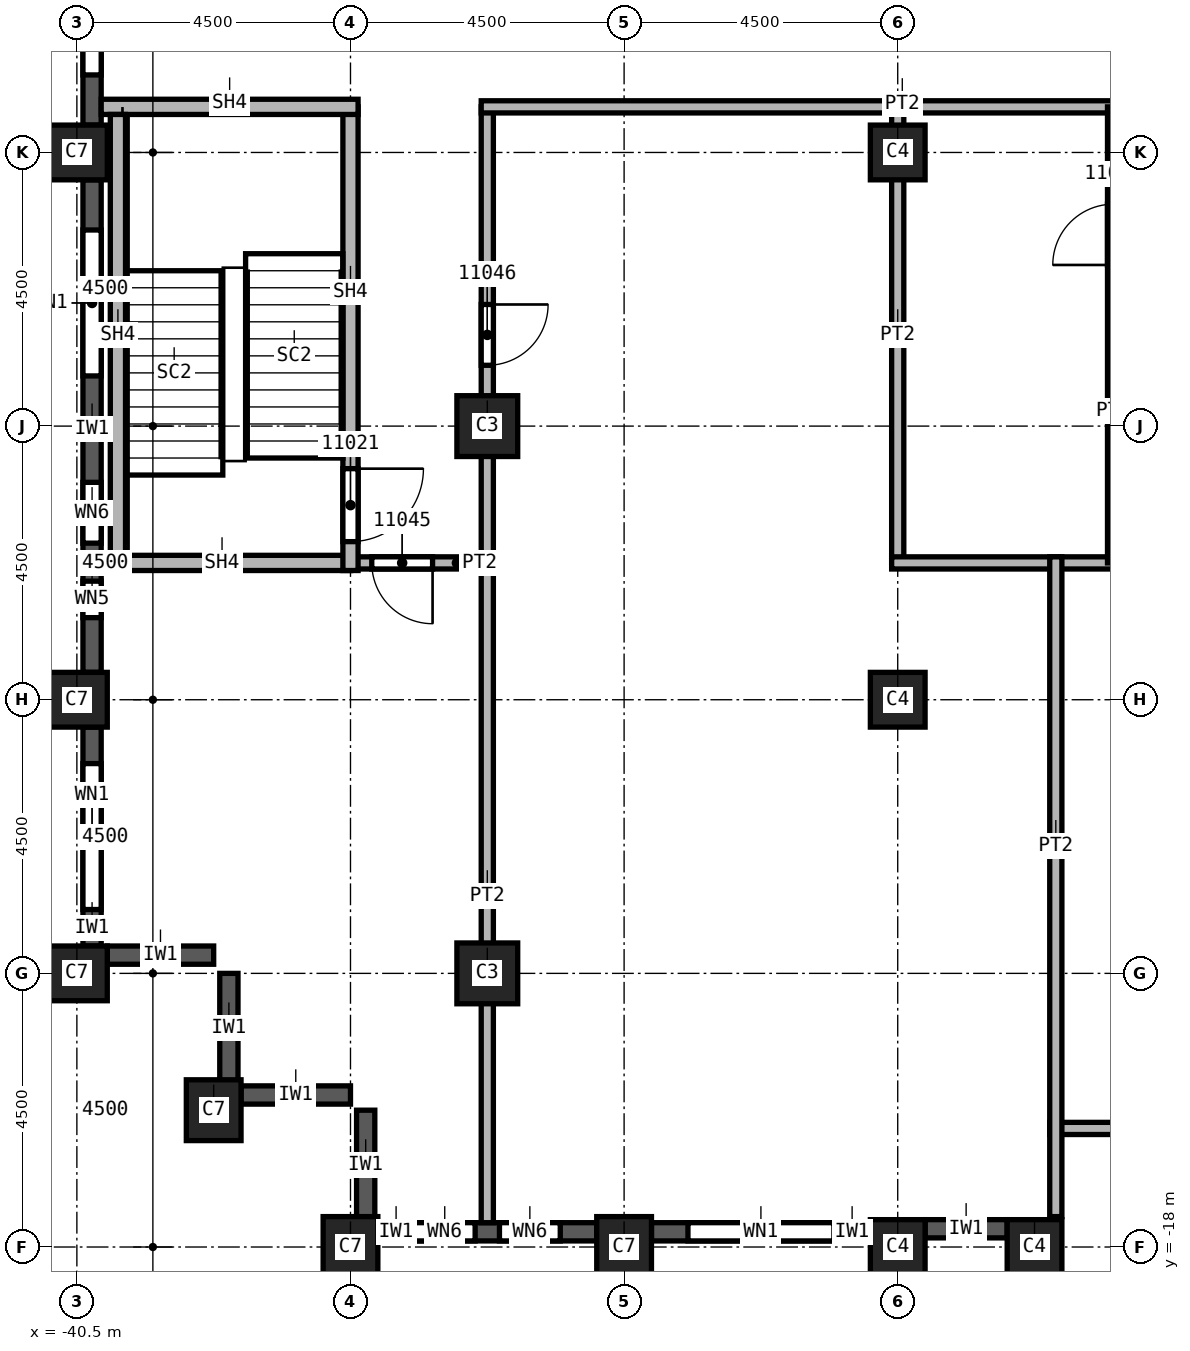
"""IFC4 building model, lengths in metres.
Left out: names, types, materials, properties, quantities, classifications, styles, units other than length and angle.
Written with IfcOpenShell. Run it as: python <this file> out.ifc"""

import sys

from ifc_helpers import new_model, si_unit, direction, frame, frame_2d, origin, origin_2d, place, context, subcontext, project, spatial, rectangle, extrude, element, fill, save


model = new_model("IFC4")
c1 = context("Model", 3, precision=1e-05, world=origin(), true_north=direction((0.0, 1.0)))
c2 = subcontext(c1, "Body", "Model", "MODEL_VIEW")
j1 = project(units=[si_unit("LENGTHUNIT", "METRE"), si_unit("PLANEANGLEUNIT", "RADIAN")], contexts=[c1])
p1 = place(None, origin())
s1 = spatial("IfcSite", under=j1, at=p1, CompositionType="ELEMENT")
p2 = place(p1, origin())
s2 = spatial("IfcBuilding", under=s1, at=p2, CompositionType="ELEMENT")
p3 = place(p2, frame((0.0, 0.0, 188.0)))
s3 = spatial("IfcBuildingStorey", under=s2, at=p3, CompositionType="ELEMENT", Elevation=188.0)
for number, where, z_axis, x_axis in (
    (1, (-40.5, 0.0, 0.0), (0.0, 0.0, 1.0), (0.0, 1.0, 0.0)),
    (2, (-40.5, -9.0, 0.0), (0.0, 0.0, 1.0), (0.0, 1.0, 0.0)),
    (3, (-40.5, -13.5, 0.0), (0.0, 0.0, 1.0), (0.0, 1.0, 0.0)),
    (4, (-38.25, -15.75, 0.0), (0.0, 0.0, 1.0), (1.0, 0.0, 0.0)),
    (5, (-31.5, -18.0, 0.0), (0.0, 0.0, 1.0), (1.0, 0.0, 0.0)),
    (6, (-36.0, -18.0, 0.0), (0.0, 0.0, 1.0), (1.0, 0.0, 0.0)),
):
    element("IfcColumn", number, at=place(p3, frame(where, z_axis=z_axis, x_axis=x_axis)), inside=s3, PredefinedType="COLUMN", context=c2, shape_type="SweptSolid", body=[
        extrude(rectangle(XDim=0.9, YDim=1.0, at=origin_2d()), origin(), (0.0, 0.0, 1.0), 3.72),
    ])
for number, where, z_axis, x_axis in (
    (7, (-33.75, -4.5, 0.0), (0.0, 0.0, 1.0), (1.0, 0.0, 0.0)),
    (8, (-33.75, -13.5, 0.0), (0.0, 0.0, 1.0), (1.0, 0.0, 0.0)),
):
    element("IfcColumn", number, at=place(p3, frame(where, z_axis=z_axis, x_axis=x_axis)), inside=s3, PredefinedType="COLUMN", context=c2, shape_type="SweptSolid", body=[
        extrude(rectangle(XDim=1.0, YDim=1.0, at=origin_2d()), origin(), (0.0, 0.0, 1.0), 3.72),
    ])
for number, where, z_axis, x_axis in (
    (9, (-27.0, 0.0, 0.0), (0.0, 0.0, 1.0), (1.0, 0.0, 0.0)),
    (10, (-27.0, -9.0, 0.0), (0.0, 0.0, 1.0), (1.0, 0.0, 0.0)),
    (11, (-27.0, -18.0, 0.0), (0.0, 0.0, 1.0), (1.0, 0.0, 0.0)),
    (12, (-24.75, -18.0, 0.0), (0.0, 0.0, 1.0), (1.0, 0.0, 0.0)),
):
    element("IfcColumn", number, at=place(p3, frame(where, z_axis=z_axis, x_axis=x_axis)), inside=s3, PredefinedType="COLUMN", context=c2, shape_type="SweptSolid", body=[
        extrude(rectangle(XDim=0.9, YDim=0.9, at=origin_2d()), origin(), (0.0, 0.0, 1.0), 3.72),
    ])
p4 = place(p3, frame((-40.0, -13.2, 0.0), z_axis=(0.0, 0.0, 1.0), x_axis=(1.0, 0.0, 0.0)))
e13 = element("IfcWall", 13, at=p4, inside=s3, PredefinedType="SOLIDWALL", context=c2, shape_type="SweptSolid", body=[
    extrude(rectangle(XDim=1.75, YDim=0.3, at=frame_2d((0.875, 0.0))), origin(), (0.0, 0.0, 1.0), 3.12),
])
for number, where, z_axis, x_axis in (
    (14, (-38.0, -15.3, 0.0), (0.0, 0.0, 1.0), (0.0, 1.0, 0.0)),
    (15, (-37.8, -15.5, 0.0), (0.0, 0.0, 1.0), (1.0, 0.0, 0.0)),
    (16, (-35.75, -17.55, 0.0), (0.0, 0.0, 1.0), (0.0, 1.0, 0.0)),
):
    element("IfcWall", number, at=place(p3, frame(where, z_axis=z_axis, x_axis=x_axis)), inside=s3, PredefinedType="SOLIDWALL", context=c2, shape_type="SweptSolid", body=[
        extrude(rectangle(XDim=1.8, YDim=0.3, at=frame_2d((0.9, 0.0))), origin(), (0.0, 0.0, 1.0), 3.12),
    ])
p5 = place(p3, frame((-40.25, 8.55, 0.0), z_axis=(0.0, 0.0, 1.0), x_axis=(0.0, -1.0, 0.0)))
e17 = element("IfcWall", 17, at=p5, inside=s3, PredefinedType="SOLIDWALL", context=c2, shape_type="SweptSolid", body=[
    extrude(rectangle(XDim=8.1, YDim=0.3, at=frame_2d((4.05, 0.0))), origin(), (0.0, 0.0, 1.0), 3.12),
])
p6 = place(p5, frame((0.825, 0.0, 0.8)))
e18 = element("IfcOpeningElement", 18, at=p6, cuts=e17, PredefinedType="OPENING", context=c2, shape_type="SweptSolid", body=[
    extrude(rectangle(XDim=2.4, YDim=1.95, at=frame_2d((1.2, 0.975))), frame((0.0, 0.15, 0.0), z_axis=(0.0, -1.0, 0.0), x_axis=(1.0, 0.0, 0.0)), (0.0, 0.0, 1.0), 0.3),
])
p7 = place(p5, frame((4.875, 0.0, 0.8)))
e19 = element("IfcOpeningElement", 19, at=p7, cuts=e17, PredefinedType="OPENING", context=c2, shape_type="SweptSolid", body=[
    extrude(rectangle(XDim=2.4, YDim=1.95, at=frame_2d((1.2, 0.975))), frame((0.0, 0.15, 0.0), z_axis=(0.0, -1.0, 0.0), x_axis=(1.0, 0.0, 0.0)), (0.0, 0.0, 1.0), 0.3),
])
p8 = place(p3, frame((-40.25, -0.45, 0.0), z_axis=(0.0, 0.0, 1.0), x_axis=(0.0, -1.0, 0.0)))
e20 = element("IfcWall", 20, at=p8, inside=s3, PredefinedType="SOLIDWALL", context=c2, shape_type="SweptSolid", body=[
    extrude(rectangle(XDim=8.1, YDim=0.3, at=frame_2d((4.05, 0.0))), origin(), (0.0, 0.0, 1.0), 3.12),
])
p9 = place(p8, frame((0.825, 0.0, 0.8)))
e21 = element("IfcOpeningElement", 21, at=p9, cuts=e20, PredefinedType="OPENING", context=c2, shape_type="SweptSolid", body=[
    extrude(rectangle(XDim=2.4, YDim=1.95, at=frame_2d((1.2, 0.975))), frame((0.0, 0.15, 0.0), z_axis=(0.0, -1.0, 0.0), x_axis=(1.0, 0.0, 0.0)), (0.0, 0.0, 1.0), 0.3),
])
p10 = place(p8, frame((4.975, 0.0, 0.8)))
e22 = element("IfcOpeningElement", 22, at=p10, cuts=e20, PredefinedType="OPENING", context=c2, shape_type="SweptSolid", body=[
    extrude(rectangle(XDim=1.0, YDim=1.95, at=frame_2d((0.5, 0.975))), frame((0.0, 0.15, 0.0), z_axis=(0.0, -1.0, 0.0), x_axis=(1.0, 0.0, 0.0)), (0.0, 0.0, 1.0), 0.3),
])
p11 = place(p8, frame((6.6, 0.0, 0.8)))
e23 = element("IfcOpeningElement", 23, at=p11, cuts=e20, PredefinedType="OPENING", context=c2, shape_type="SweptSolid", body=[
    extrude(rectangle(XDim=0.6, YDim=1.95, at=frame_2d((0.3, 0.975))), frame((0.0, 0.15, 0.0), z_axis=(0.0, -1.0, 0.0), x_axis=(1.0, 0.0, 0.0)), (0.0, 0.0, 1.0), 0.3),
])
p12 = place(p3, frame((-40.25, -9.45, 0.0), z_axis=(0.0, 0.0, 1.0), x_axis=(0.0, -1.0, 0.0)))
e24 = element("IfcWall", 24, at=p12, inside=s3, PredefinedType="SOLIDWALL", context=c2, shape_type="SweptSolid", body=[
    extrude(rectangle(XDim=3.6, YDim=0.3, at=frame_2d((1.8, 0.0))), origin(), (0.0, 0.0, 1.0), 3.12),
])
p13 = place(p12, frame((0.6, 0.0, 0.8)))
e25 = element("IfcOpeningElement", 25, at=p13, cuts=e24, PredefinedType="OPENING", context=c2, shape_type="SweptSolid", body=[
    extrude(rectangle(XDim=2.4, YDim=1.95, at=frame_2d((1.2, 0.975))), frame((0.0, 0.15, 0.0), z_axis=(0.0, -1.0, 0.0), x_axis=(1.0, 0.0, 0.0)), (0.0, 0.0, 1.0), 0.3),
])
p14 = place(p3, frame((-35.55, -17.75, 0.0), z_axis=(0.0, 0.0, 1.0), x_axis=(1.0, 0.0, 0.0)))
e26 = element("IfcWall", 26, at=p14, inside=s3, PredefinedType="SOLIDWALL", context=c2, shape_type="SweptSolid", body=[
    extrude(rectangle(XDim=3.6, YDim=0.3, at=frame_2d((1.8, 0.0))), origin(), (0.0, 0.0, 1.0), 3.12),
])
p15 = place(p14, frame((0.6, 0.0, 0.8)))
e27 = element("IfcOpeningElement", 27, at=p15, cuts=e26, PredefinedType="OPENING", context=c2, shape_type="SweptSolid", body=[
    extrude(rectangle(XDim=1.0, YDim=1.95, at=frame_2d((0.5, 0.975))), frame((0.0, 0.15, 0.0), z_axis=(0.0, -1.0, 0.0), x_axis=(1.0, 0.0, 0.0)), (0.0, 0.0, 1.0), 0.3),
])
p16 = place(p14, frame((2.0, 0.0, 0.8)))
e28 = element("IfcOpeningElement", 28, at=p16, cuts=e26, PredefinedType="OPENING", context=c2, shape_type="SweptSolid", body=[
    extrude(rectangle(XDim=1.0, YDim=1.95, at=frame_2d((0.5, 0.975))), frame((0.0, 0.15, 0.0), z_axis=(0.0, -1.0, 0.0), x_axis=(1.0, 0.0, 0.0)), (0.0, 0.0, 1.0), 0.3),
])
p17 = place(p3, frame((-31.05, -17.75, 0.0), z_axis=(0.0, 0.0, 1.0), x_axis=(1.0, 0.0, 0.0)))
e29 = element("IfcWall", 29, at=p17, inside=s3, PredefinedType="SOLIDWALL", context=c2, shape_type="SweptSolid", body=[
    extrude(rectangle(XDim=3.6, YDim=0.3, at=frame_2d((1.8, 0.0))), origin(), (0.0, 0.0, 1.0), 3.12),
])
p18 = place(p17, frame((0.6, 0.0, 0.8)))
e30 = element("IfcOpeningElement", 30, at=p18, cuts=e29, PredefinedType="OPENING", context=c2, shape_type="SweptSolid", body=[
    extrude(rectangle(XDim=2.4, YDim=1.95, at=frame_2d((1.2, 0.975))), frame((0.0, 0.15, 0.0), z_axis=(0.0, -1.0, 0.0), x_axis=(1.0, 0.0, 0.0)), (0.0, 0.0, 1.0), 0.3),
])
p19 = place(p3, frame((-26.55, -17.7, 0.0), z_axis=(0.0, 0.0, 1.0), x_axis=(1.0, 0.0, 0.0)))
e31 = element("IfcWall", 31, at=p19, inside=s3, PredefinedType="SOLIDWALL", context=c2, shape_type="SweptSolid", body=[
    extrude(rectangle(XDim=1.35, YDim=0.3, at=frame_2d((0.675, 0.0))), origin(), (0.0, 0.0, 1.0), 3.12),
])
p20 = place(p3, frame((-33.75, 0.75, 0.0), z_axis=(0.0, 0.0, 1.0), x_axis=(0.0, -1.0, 0.0)))
e32 = element("IfcWall", 32, at=p20, inside=s3, PredefinedType="PARTITIONING", context=c2, shape_type="SweptSolid", body=[
    extrude(rectangle(XDim=18.35, YDim=0.2, at=frame_2d((9.175, 0.0))), origin(), (0.0, 0.0, 1.0), 3.72),
])
p21 = place(p20, frame((3.25, 0.0, 0.0)))
e33 = element("IfcOpeningElement", 33, at=p21, cuts=e32, PredefinedType="OPENING", context=c2, shape_type="SweptSolid", body=[
    extrude(rectangle(XDim=1.0, YDim=2.1, at=frame_2d((0.5, 1.05))), frame((0.0, 0.1, 0.0), z_axis=(0.0, -1.0, 0.0), x_axis=(1.0, 0.0, 0.0)), (0.0, 0.0, 1.0), 0.2),
])
p22 = place(p3, frame((-33.65, -6.75, 0.0), z_axis=(0.0, 0.0, 1.0), x_axis=(-1.0, 0.0, 0.0)))
e34 = element("IfcWall", 34, at=p22, inside=s3, PredefinedType="PARTITIONING", context=c2, shape_type="SweptSolid", body=[
    extrude(rectangle(XDim=2.35, YDim=0.2, at=frame_2d((1.175, 0.0))), origin(), (0.0, 0.0, 1.0), 3.72),
])
p23 = place(p22, frame((1.0, 0.0, 0.0)))
e35 = element("IfcOpeningElement", 35, at=p23, cuts=e34, PredefinedType="OPENING", context=c2, shape_type="SweptSolid", body=[
    extrude(rectangle(XDim=1.0, YDim=2.1, at=frame_2d((0.5, 1.05))), frame((0.0, 0.1, 0.0), z_axis=(0.0, -1.0, 0.0), x_axis=(1.0, 0.0, 0.0)), (0.0, 0.0, 1.0), 0.2),
])
p24 = place(p3, frame((-27.0, -6.75, 0.0), z_axis=(0.0, 0.0, 1.0), x_axis=(0.0, 1.0, 0.0)))
e36 = element("IfcWall", 36, at=p24, inside=s3, PredefinedType="PARTITIONING", context=c2, shape_type="SweptSolid", body=[
    extrude(rectangle(XDim=7.5, YDim=0.2, at=frame_2d((3.75, 0.0))), origin(), (0.0, 0.0, 1.0), 3.72),
])
p25 = place(p3, frame((-19.9, 0.75, 0.0), z_axis=(0.0, 0.0, 1.0), x_axis=(-1.0, 0.0, 0.0)))
e37 = element("IfcWall", 37, at=p25, inside=s3, PredefinedType="PARTITIONING", context=c2, shape_type="SweptSolid", body=[
    extrude(rectangle(XDim=13.95, YDim=0.2, at=frame_2d((6.975, 0.0))), origin(), (0.0, 0.0, 1.0), 3.72),
])
p26 = place(p3, frame((-24.5, -16.05, 0.0), z_axis=(0.0, 0.0, 1.0), x_axis=(1.0, 0.0, 0.0)))
e38 = element("IfcWall", 38, at=p26, inside=s3, PredefinedType="PARTITIONING", context=c2, shape_type="SweptSolid", body=[
    extrude(rectangle(XDim=4.6, YDim=0.2, at=frame_2d((2.3, 0.0))), origin(), (0.0, 0.0, 1.0), 3.72),
])
p27 = place(p3, frame((-27.1, -6.75, 0.0), z_axis=(0.0, 0.0, 1.0), x_axis=(1.0, 0.0, 0.0)))
e39 = element("IfcWall", 39, at=p27, inside=s3, PredefinedType="PARTITIONING", context=c2, shape_type="SweptSolid", body=[
    extrude(rectangle(XDim=7.2, YDim=0.2, at=frame_2d((3.6, 0.0))), origin(), (0.0, 0.0, 1.0), 3.72),
])
p28 = place(p3, frame((-24.4, -17.5, 0.0), z_axis=(0.0, 0.0, 1.0), x_axis=(0.0, 1.0, 0.0)))
e40 = element("IfcWall", 40, at=p28, inside=s3, PredefinedType="PARTITIONING", context=c2, shape_type="SweptSolid", body=[
    extrude(rectangle(XDim=10.85, YDim=0.2, at=frame_2d((5.425, 0.0))), origin(), (0.0, 0.0, 1.0), 3.72),
])
p29 = place(p3, frame((-23.45, -6.75, 0.0), z_axis=(0.0, 0.0, 1.0), x_axis=(0.0, 1.0, 0.0)))
e41 = element("IfcWall", 41, at=p29, inside=s3, PredefinedType="PARTITIONING", context=c2, shape_type="SweptSolid", body=[
    extrude(rectangle(XDim=7.5, YDim=0.2, at=frame_2d((3.75, 0.0))), origin(), (0.0, 0.0, 1.0), 3.72),
])
p30 = place(p29, frame((4.9, 0.0, 0.0)))
e42 = element("IfcOpeningElement", 42, at=p30, cuts=e41, PredefinedType="OPENING", context=c2, shape_type="SweptSolid", body=[
    extrude(rectangle(XDim=1.0, YDim=2.1, at=frame_2d((0.5, 1.05))), frame((0.0, 0.1, 0.0), z_axis=(0.0, -1.0, 0.0), x_axis=(1.0, 0.0, 0.0)), (0.0, 0.0, 1.0), 0.2),
])
p31 = place(p3, frame((-36.0, -6.75, 0.0), z_axis=(0.0, 0.0, 1.0), x_axis=(-1.0, 0.0, 0.0)))
e43 = element("IfcWall", 43, at=p31, inside=s3, PredefinedType="SOLIDWALL", context=c2, shape_type="SweptSolid", body=[
    extrude(rectangle(XDim=4.1, YDim=0.25, at=frame_2d((2.05, 0.0))), origin(), (0.0, 0.0, 1.0), 3.72),
])
p32 = place(p3, frame((-36.0, 0.75, 0.0), z_axis=(0.0, 0.0, 1.0), x_axis=(0.0, -1.0, 0.0)))
e44 = element("IfcWall", 44, at=p32, inside=s3, PredefinedType="SOLIDWALL", context=c2, shape_type="SweptSolid", body=[
    extrude(rectangle(XDim=7.625, YDim=0.25, at=frame_2d((3.812, 0.0))), origin(), (0.0, 0.0, 1.0), 3.72),
])
p33 = place(p32, frame((5.95, 0.0, 0.0)))
e45 = element("IfcOpeningElement", 45, at=p33, cuts=e44, PredefinedType="OPENING", context=c2, shape_type="SweptSolid", body=[
    extrude(rectangle(XDim=1.2, YDim=2.1, at=frame_2d((0.6, 1.05))), frame((0.0, 0.125, 0.0), z_axis=(0.0, -1.0, 0.0), x_axis=(1.0, 0.0, 0.0)), (0.0, 0.0, 1.0), 0.25),
])
p34 = place(p3, frame((-35.875, 0.75, 0.0), z_axis=(0.0, 0.0, 1.0), x_axis=(-1.0, 0.0, 0.0)))
e46 = element("IfcWall", 46, at=p34, inside=s3, PredefinedType="SOLIDWALL", context=c2, shape_type="SweptSolid", body=[
    extrude(rectangle(XDim=4.225, YDim=0.25, at=frame_2d((2.113, 0.0))), origin(), (0.0, 0.0, 1.0), 3.72),
])
p35 = place(p3, frame((-39.825, -6.625, 0.0), z_axis=(0.0, 0.0, 1.0), x_axis=(0.0, 1.0, 0.0)))
e47 = element("IfcWall", 47, at=p35, inside=s3, PredefinedType="SOLIDWALL", context=c2, shape_type="SweptSolid", body=[
    extrude(rectangle(XDim=7.25, YDim=0.25, at=frame_2d((3.625, 0.0))), origin(), (0.0, 0.0, 1.0), 3.72),
])
p36 = place(p7, origin())
e48 = element("IfcWindow", 48, at=p36, inside=s3, PartitioningType="SINGLE_PANEL", PredefinedType="WINDOW", context=c2, shape_type="SweptSolid", body=[
    extrude(rectangle(XDim=2.4, YDim=1.95, at=frame_2d((1.2, 0.975))), frame((0.0, 0.03, 0.0), z_axis=(0.0, -1.0, 0.0), x_axis=(1.0, 0.0, 0.0)), (0.0, 0.0, 1.0), 0.06),
])
fill(e19, e48)
p37 = place(p9, origin())
e49 = element("IfcWindow", 49, at=p37, inside=s3, PartitioningType="SINGLE_PANEL", PredefinedType="WINDOW", context=c2, shape_type="SweptSolid", body=[
    extrude(rectangle(XDim=2.4, YDim=1.95, at=frame_2d((1.2, 0.975))), frame((0.0, 0.03, 0.0), z_axis=(0.0, -1.0, 0.0), x_axis=(1.0, 0.0, 0.0)), (0.0, 0.0, 1.0), 0.06),
])
fill(e21, e49)
p38 = place(p13, origin())
e50 = element("IfcWindow", 50, at=p38, inside=s3, PartitioningType="SINGLE_PANEL", PredefinedType="WINDOW", context=c2, shape_type="SweptSolid", body=[
    extrude(rectangle(XDim=2.4, YDim=1.95, at=frame_2d((1.2, 0.975))), frame((0.0, 0.03, 0.0), z_axis=(0.0, -1.0, 0.0), x_axis=(1.0, 0.0, 0.0)), (0.0, 0.0, 1.0), 0.06),
])
fill(e25, e50)
p39 = place(p18, origin())
e51 = element("IfcWindow", 51, at=p39, inside=s3, PartitioningType="SINGLE_PANEL", PredefinedType="WINDOW", context=c2, shape_type="SweptSolid", body=[
    extrude(rectangle(XDim=2.4, YDim=1.95, at=frame_2d((1.2, 0.975))), frame((0.0, 0.03, 0.0), z_axis=(0.0, -1.0, 0.0), x_axis=(1.0, 0.0, 0.0)), (0.0, 0.0, 1.0), 0.06),
])
fill(e30, e51)
p40 = place(p33, origin())
e52 = element("IfcDoor", 52, at=p40, inside=s3, OperationType="SINGLE_SWING_RIGHT", PredefinedType="DOOR", context=c2, shape_type="SweptSolid", body=[
    extrude(rectangle(XDim=1.2, YDim=2.1, at=frame_2d((0.6, 1.05))), frame((0.0, 0.025, 0.0), z_axis=(0.0, -1.0, 0.0), x_axis=(1.0, 0.0, 0.0)), (0.0, 0.0, 1.0), 0.05),
])
fill(e45, e52)
p41 = place(p23, origin())
e53 = element("IfcDoor", 53, at=p41, inside=s3, OperationType="SINGLE_SWING_RIGHT", PredefinedType="DOOR", context=c2, shape_type="SweptSolid", body=[
    extrude(rectangle(XDim=1.0, YDim=2.1, at=frame_2d((0.5, 1.05))), frame((0.0, 0.025, 0.0), z_axis=(0.0, -1.0, 0.0), x_axis=(1.0, 0.0, 0.0)), (0.0, 0.0, 1.0), 0.05),
])
fill(e35, e53)
p42 = place(p21, origin())
e54 = element("IfcDoor", 54, at=p42, inside=s3, OperationType="SINGLE_SWING_LEFT", PredefinedType="DOOR", context=c2, shape_type="SweptSolid", body=[
    extrude(rectangle(XDim=1.0, YDim=2.1, at=frame_2d((0.5, 1.05))), frame((0.0, 0.025, 0.0), z_axis=(0.0, -1.0, 0.0), x_axis=(1.0, 0.0, 0.0)), (0.0, 0.0, 1.0), 0.05),
])
fill(e33, e54)
p43 = place(p10, origin())
e55 = element("IfcWindow", 55, at=p43, inside=s3, PartitioningType="SINGLE_PANEL", PredefinedType="WINDOW", context=c2, shape_type="SweptSolid", body=[
    extrude(rectangle(XDim=1.0, YDim=1.95, at=frame_2d((0.5, 0.975))), frame((0.0, 0.03, 0.0), z_axis=(0.0, -1.0, 0.0), x_axis=(1.0, 0.0, 0.0)), (0.0, 0.0, 1.0), 0.06),
])
fill(e22, e55)
p44 = place(p11, origin())
e56 = element("IfcWindow", 56, at=p44, inside=s3, PartitioningType="SINGLE_PANEL", PredefinedType="WINDOW", context=c2, shape_type="SweptSolid", body=[
    extrude(rectangle(XDim=0.6, YDim=1.95, at=frame_2d((0.3, 0.975))), frame((0.0, 0.03, 0.0), z_axis=(0.0, -1.0, 0.0), x_axis=(1.0, 0.0, 0.0)), (0.0, 0.0, 1.0), 0.06),
])
fill(e23, e56)
p45 = place(p15, origin())
e57 = element("IfcWindow", 57, at=p45, inside=s3, PartitioningType="SINGLE_PANEL", PredefinedType="WINDOW", context=c2, shape_type="SweptSolid", body=[
    extrude(rectangle(XDim=1.0, YDim=1.95, at=frame_2d((0.5, 0.975))), frame((0.0, 0.03, 0.0), z_axis=(0.0, -1.0, 0.0), x_axis=(1.0, 0.0, 0.0)), (0.0, 0.0, 1.0), 0.06),
])
fill(e27, e57)
p46 = place(p16, origin())
e58 = element("IfcWindow", 58, at=p46, inside=s3, PartitioningType="SINGLE_PANEL", PredefinedType="WINDOW", context=c2, shape_type="SweptSolid", body=[
    extrude(rectangle(XDim=1.0, YDim=1.95, at=frame_2d((0.5, 0.975))), frame((0.0, 0.03, 0.0), z_axis=(0.0, -1.0, 0.0), x_axis=(1.0, 0.0, 0.0)), (0.0, 0.0, 1.0), 0.06),
])
fill(e28, e58)
save(model, sys.argv[1])
